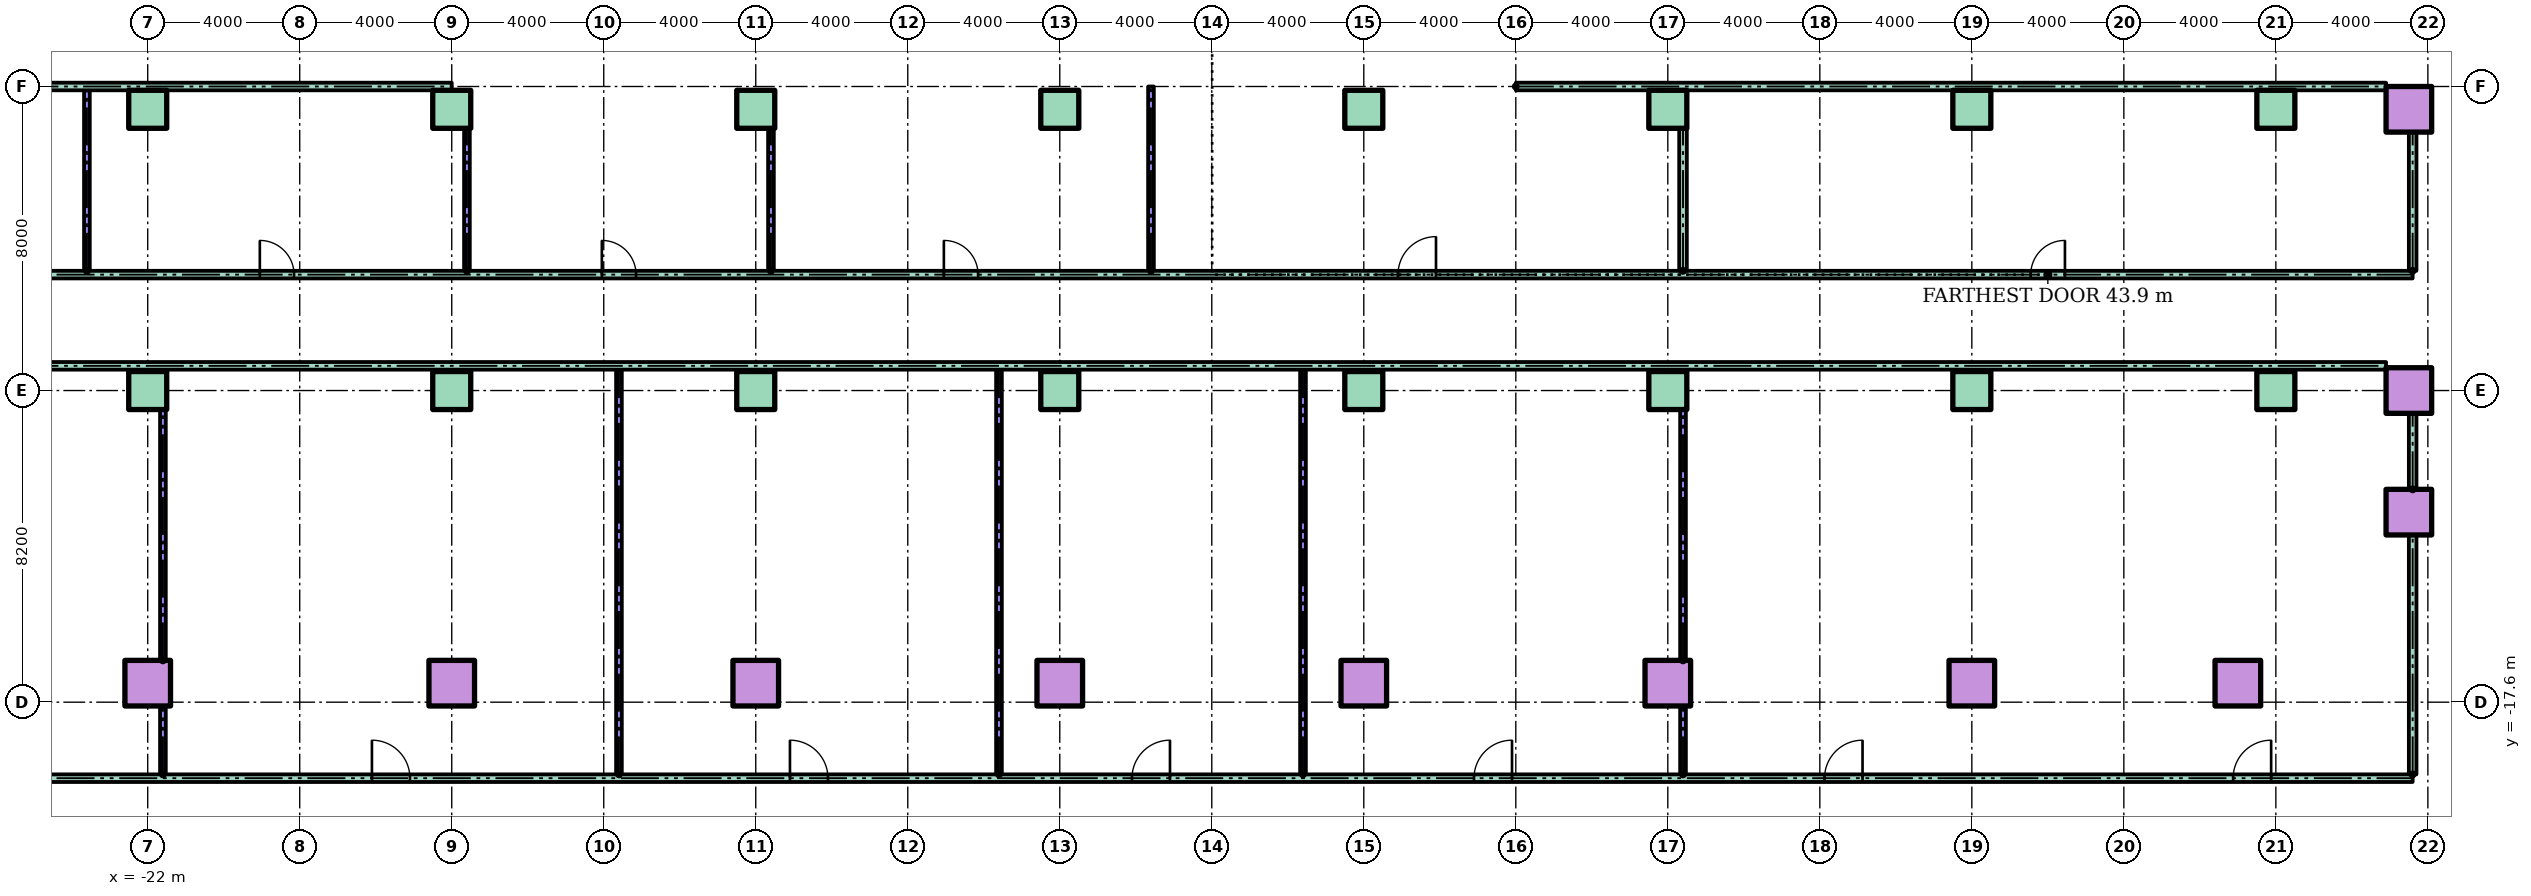
"""IFC4 building model, lengths in metres.
Left out: names, types, materials, properties, quantities, classifications, styles, units other than length and angle.
Written with IfcOpenShell. Run it as: python <this file> out.ifc"""

import sys

from ifc_helpers import new_model, si_unit, direction, frame, frame_2d, origin, origin_2d, place, context, subcontext, project, spatial, rectangle, hollow_rectangle, extrude, element, fill, save


model = new_model("IFC4")
c1 = context("Model", 3, precision=1e-05, world=origin(), true_north=direction((0.0, 1.0)))
c2 = subcontext(c1, "Body", "Model", "MODEL_VIEW")
j1 = project(units=[si_unit("LENGTHUNIT", "METRE"), si_unit("PLANEANGLEUNIT", "RADIAN")], contexts=[c1])
p1 = place(None, origin())
s1 = spatial("IfcSite", under=j1, at=p1, CompositionType="ELEMENT")
p2 = place(p1, origin())
s2 = spatial("IfcBuilding", under=s1, at=p2, CompositionType="ELEMENT")
p3 = place(p2, frame((0.0, 0.0, 10.0)))
s3 = spatial("IfcBuildingStorey", under=s2, at=p3, CompositionType="ELEMENT", Elevation=10.0)
for number, where in (
    (1, (-22.0, -17.1, 0.0)),
    (2, (-14.0, -17.1, 0.0)),
    (3, (-6.0, -17.1, 0.0)),
    (4, (2.0, -17.1, 0.0)),
    (5, (10.0, -17.1, 0.0)),
    (6, (18.0, -17.1, 0.0)),
    (7, (26.0, -17.1, 0.0)),
    (8, (33.0, -17.1, 0.0)),
    (9, (37.5, -12.6, 0.0)),
):
    element("IfcColumn", number, at=place(p3, frame(where)), inside=s3, PredefinedType="COLUMN", context=c2, shape_type="SweptSolid", body=[
        extrude(hollow_rectangle(XDim=1.2, YDim=1.2, WallThickness=0.06, at=origin_2d()), origin(), (0.0, 0.0, 1.0), 4.0),
    ])
for number, where in (
    (10, (-22.0, -9.4, 0.0)),
    (11, (-14.0, -9.4, 0.0)),
    (12, (-6.0, -9.4, 0.0)),
    (13, (2.0, -9.4, 0.0)),
    (14, (10.0, -9.4, 0.0)),
    (15, (18.0, -9.4, 0.0)),
    (16, (26.0, -9.4, 0.0)),
    (17, (34.0, -9.4, 0.0)),
):
    element("IfcColumn", number, at=place(p3, frame(where)), inside=s3, PredefinedType="COLUMN", context=c2, shape_type="SweptSolid", body=[
        extrude(rectangle(XDim=1.0, YDim=1.0, at=origin_2d()), origin(), (0.0, 0.0, 1.0), 4.0),
    ])
p4 = place(p3, frame((37.5, -9.4, 0.0)))
e18 = element("IfcColumn", 18, at=p4, inside=s3, PredefinedType="COLUMN", context=c2, shape_type="SweptSolid", body=[
    extrude(hollow_rectangle(XDim=1.2, YDim=1.2, WallThickness=0.06, at=origin_2d()), origin(), (0.0, 0.0, 1.0), 4.0),
])
for number, where in (
    (19, (-22.0, -2.0, 0.0)),
    (20, (-14.0, -2.0, 0.0)),
    (21, (-6.0, -2.0, 0.0)),
    (22, (2.0, -2.0, 0.0)),
    (23, (10.0, -2.0, 0.0)),
    (24, (18.0, -2.0, 0.0)),
    (25, (26.0, -2.0, 0.0)),
    (26, (34.0, -2.0, 0.0)),
):
    element("IfcColumn", number, at=place(p3, frame(where)), inside=s3, PredefinedType="COLUMN", context=c2, shape_type="SweptSolid", body=[
        extrude(rectangle(XDim=1.0, YDim=1.0, at=origin_2d()), origin(), (0.0, 0.0, 1.0), 4.0),
    ])
p5 = place(p3, frame((37.5, -2.0, 0.0)))
e27 = element("IfcColumn", 27, at=p5, inside=s3, PredefinedType="COLUMN", context=c2, shape_type="SweptSolid", body=[
    extrude(hollow_rectangle(XDim=1.2, YDim=1.2, WallThickness=0.06, at=origin_2d()), origin(), (0.0, 0.0, 1.0), 4.0),
])
p6 = place(p3, frame((-37.6, -19.6, 0.0)))
e28 = element("IfcWall", 28, at=p6, inside=s3, PredefinedType="PARTITIONING", context=c2, shape_type="SweptSolid", body=[
    extrude(rectangle(XDim=75.2, YDim=0.2, at=frame_2d((37.6, 0.0))), origin(), (0.0, 0.0, 1.0), 3.7),
])
p7 = place(p6, frame((2.97, 0.0, 0.0)))
e29 = element("IfcOpeningElement", 29, at=p7, cuts=e28, PredefinedType="OPENING", context=c2, shape_type="SweptSolid", body=[
    extrude(rectangle(XDim=1.1, YDim=2.1, at=frame_2d((0.55, 1.05))), frame((0.0, 0.11, 0.0), z_axis=(0.0, -1.0, 0.0), x_axis=(1.0, 0.0, 0.0)), (0.0, 0.0, 1.0), 0.22),
])
p8 = place(p6, frame((11.93, 0.0, 0.0)))
e30 = element("IfcOpeningElement", 30, at=p8, cuts=e28, PredefinedType="OPENING", context=c2, shape_type="SweptSolid", body=[
    extrude(rectangle(XDim=1.1, YDim=2.1, at=frame_2d((0.55, 1.05))), frame((0.0, 0.11, 0.0), z_axis=(0.0, -1.0, 0.0), x_axis=(1.0, 0.0, 0.0)), (0.0, 0.0, 1.0), 0.22),
])
p9 = place(p6, frame((21.5, 0.0, 0.0)))
e31 = element("IfcOpeningElement", 31, at=p9, cuts=e28, PredefinedType="OPENING", context=c2, shape_type="SweptSolid", body=[
    extrude(rectangle(XDim=1.0, YDim=2.1, at=frame_2d((0.5, 1.05))), frame((0.0, 0.11, 0.0), z_axis=(0.0, -1.0, 0.0), x_axis=(1.0, 0.0, 0.0)), (0.0, 0.0, 1.0), 0.22),
])
p10 = place(p6, frame((32.5, 0.0, 0.0)))
e32 = element("IfcOpeningElement", 32, at=p10, cuts=e28, PredefinedType="OPENING", context=c2, shape_type="SweptSolid", body=[
    extrude(rectangle(XDim=1.0, YDim=2.1, at=frame_2d((0.5, 1.05))), frame((0.0, 0.11, 0.0), z_axis=(0.0, -1.0, 0.0), x_axis=(1.0, 0.0, 0.0)), (0.0, 0.0, 1.0), 0.22),
])
p11 = place(p6, frame((41.5, 0.0, 0.0)))
e33 = element("IfcOpeningElement", 33, at=p11, cuts=e28, PredefinedType="OPENING", context=c2, shape_type="SweptSolid", body=[
    extrude(rectangle(XDim=1.0, YDim=2.1, at=frame_2d((0.5, 1.05))), frame((0.0, 0.11, 0.0), z_axis=(0.0, -1.0, 0.0), x_axis=(1.0, 0.0, 0.0)), (0.0, 0.0, 1.0), 0.22),
])
p12 = place(p6, frame((50.5, 0.0, 0.0)))
e34 = element("IfcOpeningElement", 34, at=p12, cuts=e28, PredefinedType="OPENING", context=c2, shape_type="SweptSolid", body=[
    extrude(rectangle(XDim=1.0, YDim=2.1, at=frame_2d((0.5, 1.05))), frame((0.0, 0.11, 0.0), z_axis=(0.0, -1.0, 0.0), x_axis=(1.0, 0.0, 0.0)), (0.0, 0.0, 1.0), 0.22),
])
p13 = place(p6, frame((59.724, 0.0, 0.0)))
e35 = element("IfcOpeningElement", 35, at=p13, cuts=e28, PredefinedType="OPENING", context=c2, shape_type="SweptSolid", body=[
    extrude(rectangle(XDim=1.0, YDim=2.1, at=frame_2d((0.5, 1.05))), frame((0.0, 0.11, 0.0), z_axis=(0.0, -1.0, 0.0), x_axis=(1.0, 0.0, 0.0)), (0.0, 0.0, 1.0), 0.22),
])
p14 = place(p6, frame((70.476, 0.0, 0.0)))
e36 = element("IfcOpeningElement", 36, at=p14, cuts=e28, PredefinedType="OPENING", context=c2, shape_type="SweptSolid", body=[
    extrude(rectangle(XDim=1.0, YDim=2.1, at=frame_2d((0.5, 1.05))), frame((0.0, 0.11, 0.0), z_axis=(0.0, -1.0, 0.0), x_axis=(1.0, 0.0, 0.0)), (0.0, 0.0, 1.0), 0.22),
])
p15 = place(p3, frame((-36.9, -8.75, 0.0)))
e37 = element("IfcWall", 37, at=p15, inside=s3, PredefinedType="PARTITIONING", context=c2, shape_type="SweptSolid", body=[
    extrude(rectangle(XDim=73.8, YDim=0.2, at=frame_2d((36.9, 0.0))), origin(), (0.0, 0.0, 1.0), 3.7),
])
p16 = place(p3, frame((-37.6, -6.35, 0.0)))
e38 = element("IfcWall", 38, at=p16, inside=s3, PredefinedType="PARTITIONING", context=c2, shape_type="SweptSolid", body=[
    extrude(rectangle(XDim=75.2, YDim=0.2, at=frame_2d((37.6, 0.0))), origin(), (0.0, 0.0, 1.0), 3.7),
])
p17 = place(p16, frame((6.5, 0.0, 0.0)))
e39 = element("IfcOpeningElement", 39, at=p17, cuts=e38, PredefinedType="OPENING", context=c2, shape_type="SweptSolid", body=[
    extrude(rectangle(XDim=1.0, YDim=2.1, at=frame_2d((0.5, 1.05))), frame((0.0, 0.11, 0.0), z_axis=(0.0, -1.0, 0.0), x_axis=(1.0, 0.0, 0.0)), (0.0, 0.0, 1.0), 0.22),
])
p18 = place(p16, frame((18.55, 0.0, 0.0)))
e40 = element("IfcOpeningElement", 40, at=p18, cuts=e38, PredefinedType="OPENING", context=c2, shape_type="SweptSolid", body=[
    extrude(rectangle(XDim=0.9, YDim=2.1, at=frame_2d((0.45, 1.05))), frame((0.0, 0.11, 0.0), z_axis=(0.0, -1.0, 0.0), x_axis=(1.0, 0.0, 0.0)), (0.0, 0.0, 1.0), 0.22),
])
p19 = place(p16, frame((27.55, 0.0, 0.0)))
e41 = element("IfcOpeningElement", 41, at=p19, cuts=e38, PredefinedType="OPENING", context=c2, shape_type="SweptSolid", body=[
    extrude(rectangle(XDim=0.9, YDim=2.1, at=frame_2d((0.45, 1.05))), frame((0.0, 0.11, 0.0), z_axis=(0.0, -1.0, 0.0), x_axis=(1.0, 0.0, 0.0)), (0.0, 0.0, 1.0), 0.22),
])
p20 = place(p16, frame((36.55, 0.0, 0.0)))
e42 = element("IfcOpeningElement", 42, at=p20, cuts=e38, PredefinedType="OPENING", context=c2, shape_type="SweptSolid", body=[
    extrude(rectangle(XDim=0.9, YDim=2.1, at=frame_2d((0.45, 1.05))), frame((0.0, 0.11, 0.0), z_axis=(0.0, -1.0, 0.0), x_axis=(1.0, 0.0, 0.0)), (0.0, 0.0, 1.0), 0.22),
])
p21 = place(p16, frame((48.5, 0.0, 0.0)))
e43 = element("IfcOpeningElement", 43, at=p21, cuts=e38, PredefinedType="OPENING", context=c2, shape_type="SweptSolid", body=[
    extrude(rectangle(XDim=1.0, YDim=2.1, at=frame_2d((0.5, 1.05))), frame((0.0, 0.11, 0.0), z_axis=(0.0, -1.0, 0.0), x_axis=(1.0, 0.0, 0.0)), (0.0, 0.0, 1.0), 0.22),
])
p22 = place(p16, frame((65.15, 0.0, 0.0)))
e44 = element("IfcOpeningElement", 44, at=p22, cuts=e38, PredefinedType="OPENING", context=c2, shape_type="SweptSolid", body=[
    extrude(rectangle(XDim=0.9, YDim=2.1, at=frame_2d((0.45, 1.05))), frame((0.0, 0.11, 0.0), z_axis=(0.0, -1.0, 0.0), x_axis=(1.0, 0.0, 0.0)), (0.0, 0.0, 1.0), 0.22),
])
for number, where in (
    (45, (-36.9, -1.4, 0.0)),
    (46, (14.0, -1.4, 0.0)),
):
    element("IfcWall", number, at=place(p3, frame(where)), inside=s3, PredefinedType="PARTITIONING", context=c2, shape_type="SweptSolid", body=[
        extrude(rectangle(XDim=22.9, YDim=0.2, at=frame_2d((11.45, 0.0))), origin(), (0.0, 0.0, 1.0), 3.7),
    ])
p23 = place(p3, frame((-23.6, -6.25, 0.0), z_axis=(0.0, 0.0, 1.0), x_axis=(0.0, 1.0, 0.0)))
e47 = element("IfcWall", 47, at=p23, inside=s3, PredefinedType="PARTITIONING", context=c2, shape_type="SweptSolid", body=[
    extrude(rectangle(XDim=4.75, YDim=0.15, at=frame_2d((2.375, 0.0))), origin(), (0.0, 0.0, 1.0), 3.7),
])
p24 = place(p3, frame((-21.6, -19.5, 0.0), z_axis=(0.0, 0.0, 1.0), x_axis=(0.0, 1.0, 0.0)))
e48 = element("IfcWall", 48, at=p24, inside=s3, PredefinedType="PARTITIONING", context=c2, shape_type="SweptSolid", body=[
    extrude(rectangle(XDim=1.8, YDim=0.15, at=frame_2d((0.9, 0.0))), origin(), (0.0, 0.0, 1.0), 3.7),
])
p25 = place(p3, frame((-21.6, -16.5, 0.0), z_axis=(0.0, 0.0, 1.0), x_axis=(0.0, 1.0, 0.0)))
e49 = element("IfcWall", 49, at=p25, inside=s3, PredefinedType="PARTITIONING", context=c2, shape_type="SweptSolid", body=[
    extrude(rectangle(XDim=6.6, YDim=0.15, at=frame_2d((3.3, 0.0))), origin(), (0.0, 0.0, 1.0), 3.7),
])
p26 = place(p3, frame((-13.6, -6.25, 0.0), z_axis=(0.0, 0.0, 1.0), x_axis=(0.0, 1.0, 0.0)))
e50 = element("IfcWall", 50, at=p26, inside=s3, PredefinedType="PARTITIONING", context=c2, shape_type="SweptSolid", body=[
    extrude(rectangle(XDim=3.75, YDim=0.15, at=frame_2d((1.875, 0.0))), origin(), (0.0, 0.0, 1.0), 3.7),
])
p27 = place(p3, frame((-9.6, -19.5, 0.0), z_axis=(0.0, 0.0, 1.0), x_axis=(0.0, 1.0, 0.0)))
e51 = element("IfcWall", 51, at=p27, inside=s3, PredefinedType="PARTITIONING", context=c2, shape_type="SweptSolid", body=[
    extrude(rectangle(XDim=10.65, YDim=0.15, at=frame_2d((5.325, 0.0))), origin(), (0.0, 0.0, 1.0), 3.7),
])
p28 = place(p3, frame((-5.6, -6.25, 0.0), z_axis=(0.0, 0.0, 1.0), x_axis=(0.0, 1.0, 0.0)))
e52 = element("IfcWall", 52, at=p28, inside=s3, PredefinedType="PARTITIONING", context=c2, shape_type="SweptSolid", body=[
    extrude(rectangle(XDim=3.75, YDim=0.15, at=frame_2d((1.875, 0.0))), origin(), (0.0, 0.0, 1.0), 3.7),
])
p29 = place(p3, frame((0.4, -19.5, 0.0), z_axis=(0.0, 0.0, 1.0), x_axis=(0.0, 1.0, 0.0)))
e53 = element("IfcWall", 53, at=p29, inside=s3, PredefinedType="PARTITIONING", context=c2, shape_type="SweptSolid", body=[
    extrude(rectangle(XDim=10.65, YDim=0.15, at=frame_2d((5.325, 0.0))), origin(), (0.0, 0.0, 1.0), 3.7),
])
p30 = place(p3, frame((4.4, -6.25, 0.0), z_axis=(0.0, 0.0, 1.0), x_axis=(0.0, 1.0, 0.0)))
e54 = element("IfcWall", 54, at=p30, inside=s3, PredefinedType="PARTITIONING", context=c2, shape_type="SweptSolid", body=[
    extrude(rectangle(XDim=4.85, YDim=0.15, at=frame_2d((2.425, 0.0))), origin(), (0.0, 0.0, 1.0), 3.7),
])
p31 = place(p3, frame((8.4, -19.5, 0.0), z_axis=(0.0, 0.0, 1.0), x_axis=(0.0, 1.0, 0.0)))
e55 = element("IfcWall", 55, at=p31, inside=s3, PredefinedType="PARTITIONING", context=c2, shape_type="SweptSolid", body=[
    extrude(rectangle(XDim=10.65, YDim=0.15, at=frame_2d((5.325, 0.0))), origin(), (0.0, 0.0, 1.0), 3.7),
])
p32 = place(p3, frame((18.4, -6.25, 0.0), z_axis=(0.0, 0.0, 1.0), x_axis=(0.0, 1.0, 0.0)))
e56 = element("IfcWall", 56, at=p32, inside=s3, PredefinedType="PARTITIONING", context=c2, shape_type="SweptSolid", body=[
    extrude(rectangle(XDim=3.75, YDim=0.2, at=frame_2d((1.875, 0.0))), origin(), (0.0, 0.0, 1.0), 3.7),
])
p33 = place(p3, frame((18.4, -19.5, 0.0), z_axis=(0.0, 0.0, 1.0), x_axis=(0.0, 1.0, 0.0)))
e57 = element("IfcWall", 57, at=p33, inside=s3, PredefinedType="PARTITIONING", context=c2, shape_type="SweptSolid", body=[
    extrude(rectangle(XDim=1.8, YDim=0.15, at=frame_2d((0.9, 0.0))), origin(), (0.0, 0.0, 1.0), 3.7),
])
p34 = place(p3, frame((18.4, -16.5, 0.0), z_axis=(0.0, 0.0, 1.0), x_axis=(0.0, 1.0, 0.0)))
e58 = element("IfcWall", 58, at=p34, inside=s3, PredefinedType="PARTITIONING", context=c2, shape_type="SweptSolid", body=[
    extrude(rectangle(XDim=6.6, YDim=0.15, at=frame_2d((3.3, 0.0))), origin(), (0.0, 0.0, 1.0), 3.7),
])
p35 = place(p3, frame((37.6, -19.5, 0.0), z_axis=(0.0, 0.0, 1.0), x_axis=(0.0, 1.0, 0.0)))
e59 = element("IfcWall", 59, at=p35, inside=s3, PredefinedType="PARTITIONING", context=c2, shape_type="SweptSolid", body=[
    extrude(rectangle(XDim=6.3, YDim=0.2, at=frame_2d((3.15, 0.0))), origin(), (0.0, 0.0, 1.0), 3.7),
])
p36 = place(p3, frame((37.6, -12.0, 0.0), z_axis=(0.0, 0.0, 1.0), x_axis=(0.0, 1.0, 0.0)))
e60 = element("IfcWall", 60, at=p36, inside=s3, PredefinedType="PARTITIONING", context=c2, shape_type="SweptSolid", body=[
    extrude(rectangle(XDim=2.0, YDim=0.2, at=frame_2d((1.0, 0.0))), origin(), (0.0, 0.0, 1.0), 3.7),
])
p37 = place(p3, frame((37.6, -6.25, 0.0), z_axis=(0.0, 0.0, 1.0), x_axis=(0.0, 1.0, 0.0)))
e61 = element("IfcWall", 61, at=p37, inside=s3, PredefinedType="PARTITIONING", context=c2, shape_type="SweptSolid", body=[
    extrude(rectangle(XDim=3.65, YDim=0.2, at=frame_2d((1.825, 0.0))), origin(), (0.0, 0.0, 1.0), 3.7),
])
p38 = place(p9, origin())
e62 = element("IfcDoor", 62, at=p38, inside=s3, OperationType="SINGLE_SWING_LEFT", PredefinedType="DOOR", context=c2, shape_type="SweptSolid", body=[
    extrude(rectangle(XDim=1.0, YDim=2.1, at=frame_2d((0.5, 1.05))), frame((0.0, 0.025, 0.0), z_axis=(0.0, -1.0, 0.0), x_axis=(1.0, 0.0, 0.0)), (0.0, 0.0, 1.0), 0.05),
])
fill(e31, e62)
p39 = place(p10, origin())
e63 = element("IfcDoor", 63, at=p39, inside=s3, OperationType="SINGLE_SWING_LEFT", PredefinedType="DOOR", context=c2, shape_type="SweptSolid", body=[
    extrude(rectangle(XDim=1.0, YDim=2.1, at=frame_2d((0.5, 1.05))), frame((0.0, 0.025, 0.0), z_axis=(0.0, -1.0, 0.0), x_axis=(1.0, 0.0, 0.0)), (0.0, 0.0, 1.0), 0.05),
])
fill(e32, e63)
p40 = place(p11, origin())
e64 = element("IfcDoor", 64, at=p40, inside=s3, OperationType="SINGLE_SWING_RIGHT", PredefinedType="DOOR", context=c2, shape_type="SweptSolid", body=[
    extrude(rectangle(XDim=1.0, YDim=2.1, at=frame_2d((0.5, 1.05))), frame((0.0, 0.025, 0.0), z_axis=(0.0, -1.0, 0.0), x_axis=(1.0, 0.0, 0.0)), (0.0, 0.0, 1.0), 0.05),
])
fill(e33, e64)
p41 = place(p12, origin())
e65 = element("IfcDoor", 65, at=p41, inside=s3, OperationType="SINGLE_SWING_RIGHT", PredefinedType="DOOR", context=c2, shape_type="SweptSolid", body=[
    extrude(rectangle(XDim=1.0, YDim=2.1, at=frame_2d((0.5, 1.05))), frame((0.0, 0.025, 0.0), z_axis=(0.0, -1.0, 0.0), x_axis=(1.0, 0.0, 0.0)), (0.0, 0.0, 1.0), 0.05),
])
fill(e34, e65)
p42 = place(p13, origin())
e66 = element("IfcDoor", 66, at=p42, inside=s3, OperationType="SINGLE_SWING_RIGHT", PredefinedType="DOOR", context=c2, shape_type="SweptSolid", body=[
    extrude(rectangle(XDim=1.0, YDim=2.1, at=frame_2d((0.5, 1.05))), frame((0.0, 0.025, 0.0), z_axis=(0.0, -1.0, 0.0), x_axis=(1.0, 0.0, 0.0)), (0.0, 0.0, 1.0), 0.05),
])
fill(e35, e66)
p43 = place(p14, origin())
e67 = element("IfcDoor", 67, at=p43, inside=s3, OperationType="SINGLE_SWING_RIGHT", PredefinedType="DOOR", context=c2, shape_type="SweptSolid", body=[
    extrude(rectangle(XDim=1.0, YDim=2.1, at=frame_2d((0.5, 1.05))), frame((0.0, 0.025, 0.0), z_axis=(0.0, -1.0, 0.0), x_axis=(1.0, 0.0, 0.0)), (0.0, 0.0, 1.0), 0.05),
])
fill(e36, e67)
p44 = place(p18, origin())
e68 = element("IfcDoor", 68, at=p44, inside=s3, OperationType="SINGLE_SWING_LEFT", PredefinedType="DOOR", context=c2, shape_type="SweptSolid", body=[
    extrude(rectangle(XDim=0.9, YDim=2.1, at=frame_2d((0.45, 1.05))), frame((0.0, 0.025, 0.0), z_axis=(0.0, -1.0, 0.0), x_axis=(1.0, 0.0, 0.0)), (0.0, 0.0, 1.0), 0.05),
])
fill(e40, e68)
p45 = place(p19, origin())
e69 = element("IfcDoor", 69, at=p45, inside=s3, OperationType="SINGLE_SWING_LEFT", PredefinedType="DOOR", context=c2, shape_type="SweptSolid", body=[
    extrude(rectangle(XDim=0.9, YDim=2.1, at=frame_2d((0.45, 1.05))), frame((0.0, 0.025, 0.0), z_axis=(0.0, -1.0, 0.0), x_axis=(1.0, 0.0, 0.0)), (0.0, 0.0, 1.0), 0.05),
])
fill(e41, e69)
p46 = place(p20, origin())
e70 = element("IfcDoor", 70, at=p46, inside=s3, OperationType="SINGLE_SWING_LEFT", PredefinedType="DOOR", context=c2, shape_type="SweptSolid", body=[
    extrude(rectangle(XDim=0.9, YDim=2.1, at=frame_2d((0.45, 1.05))), frame((0.0, 0.025, 0.0), z_axis=(0.0, -1.0, 0.0), x_axis=(1.0, 0.0, 0.0)), (0.0, 0.0, 1.0), 0.05),
])
fill(e42, e70)
p47 = place(p21, origin())
e71 = element("IfcDoor", 71, at=p47, inside=s3, OperationType="SINGLE_SWING_RIGHT", PredefinedType="DOOR", context=c2, shape_type="SweptSolid", body=[
    extrude(rectangle(XDim=1.0, YDim=2.1, at=frame_2d((0.5, 1.05))), frame((0.0, 0.025, 0.0), z_axis=(0.0, -1.0, 0.0), x_axis=(1.0, 0.0, 0.0)), (0.0, 0.0, 1.0), 0.05),
])
fill(e43, e71)
p48 = place(p22, origin())
e72 = element("IfcDoor", 72, at=p48, inside=s3, OperationType="SINGLE_SWING_RIGHT", PredefinedType="DOOR", context=c2, shape_type="SweptSolid", body=[
    extrude(rectangle(XDim=0.9, YDim=2.1, at=frame_2d((0.45, 1.05))), frame((0.0, 0.025, 0.0), z_axis=(0.0, -1.0, 0.0), x_axis=(1.0, 0.0, 0.0)), (0.0, 0.0, 1.0), 0.05),
])
fill(e44, e72)
save(model, sys.argv[1])
